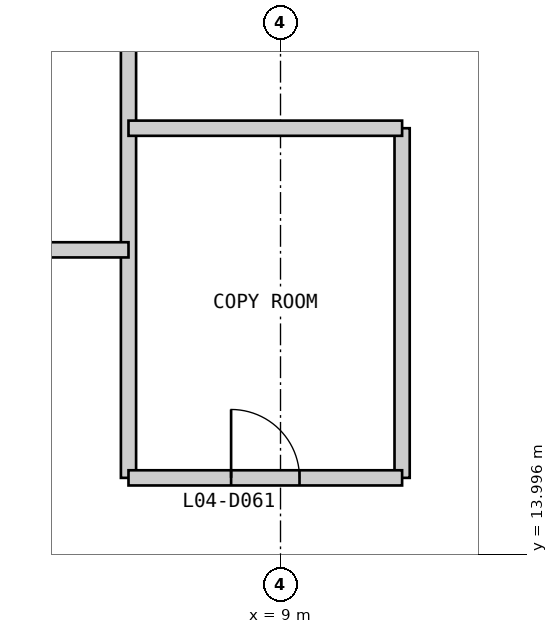
"""IFC4 building model, lengths in metres.
Left out: names, types, materials, properties, quantities, classifications, styles, units other than length and angle.
Written with IfcOpenShell. Run it as: python <this file> out.ifc"""

import sys

from ifc_helpers import new_model, si_unit, direction, frame, frame_2d, origin, place, context, subcontext, project, spatial, rectangle, extrude, element, fill, save


model = new_model("IFC4")
c1 = context("Model", 3, precision=1e-05, world=origin(), true_north=direction((0.0, 1.0)))
c2 = subcontext(c1, "Body", "Model", "MODEL_VIEW")
j1 = project(units=[si_unit("LENGTHUNIT", "METRE"), si_unit("PLANEANGLEUNIT", "RADIAN")], contexts=[c1])
p1 = place(None, origin())
s1 = spatial("IfcSite", under=j1, at=p1, CompositionType="ELEMENT")
p2 = place(p1, origin())
s2 = spatial("IfcBuilding", under=s1, at=p2, CompositionType="ELEMENT")
p3 = place(p2, frame((0.0, 0.0, 21.4)))
s3 = spatial("IfcBuildingStorey", under=s2, at=p3, CompositionType="ELEMENT", Elevation=21.4)
p4 = place(p3, frame((7.0, 15.0, 0.0), z_axis=(0.0, 0.0, 1.0), x_axis=(0.0, 1.0, 0.0)))
e1 = element("IfcWall", 1, at=p4, inside=s3, PredefinedType="PARTITIONING", context=c2, shape_type="SweptSolid", body=[
    extrude(rectangle(XDim=28.0, YDim=0.2, at=frame_2d((14.0, 0.0))), origin(), (0.0, 0.0, 1.0), 3.843),
])
p5 = place(p3, frame((10.6, 15.0, 0.0), z_axis=(0.0, 0.0, 1.0), x_axis=(0.0, 1.0, 0.0)))
e2 = element("IfcWall", 2, at=p5, inside=s3, PredefinedType="PARTITIONING", context=c2, shape_type="SweptSolid", body=[
    extrude(rectangle(XDim=4.6, YDim=0.2, at=frame_2d((2.3, 0.0))), origin(), (0.0, 0.0, 1.0), 4.5),
])
p6 = place(p3, frame((7.0, 15.0, 0.0), z_axis=(0.0, 0.0, 1.0), x_axis=(1.0, 0.0, 0.0)))
e3 = element("IfcWall", 3, at=p6, inside=s3, PredefinedType="PARTITIONING", context=c2, shape_type="SweptSolid", body=[
    extrude(rectangle(XDim=3.6, YDim=0.2, at=frame_2d((1.8, 0.0))), origin(), (0.0, 0.0, 1.0), 4.5),
])
p7 = place(p6, frame((1.35, 0.0, 0.0)))
e4 = element("IfcOpeningElement", 4, at=p7, cuts=e3, PredefinedType="OPENING", context=c2, shape_type="SweptSolid", body=[
    extrude(rectangle(XDim=0.9, YDim=2.2, at=frame_2d((0.45, 1.1))), frame((0.0, 0.11, 0.0), z_axis=(0.0, -1.0, 0.0), x_axis=(1.0, 0.0, 0.0)), (0.0, 0.0, 1.0), 0.22),
])
p8 = place(p3, frame((-2.0, 18.0, 0.0), z_axis=(0.0, 0.0, 1.0), x_axis=(1.0, 0.0, 0.0)))
e5 = element("IfcWall", 5, at=p8, inside=s3, PredefinedType="PARTITIONING", context=c2, shape_type="SweptSolid", body=[
    extrude(rectangle(XDim=9.0, YDim=0.2, at=frame_2d((4.5, 0.0))), origin(), (0.0, 0.0, 1.0), 4.5),
])
p9 = place(p3, frame((7.0, 19.6, 0.0), z_axis=(0.0, 0.0, 1.0), x_axis=(1.0, 0.0, 0.0)))
e6 = element("IfcWall", 6, at=p9, inside=s3, PredefinedType="PARTITIONING", context=c2, shape_type="SweptSolid", body=[
    extrude(rectangle(XDim=3.6, YDim=0.2, at=frame_2d((1.8, 0.0))), origin(), (0.0, 0.0, 1.0), 4.5),
])
p10 = place(p7, origin())
e7 = element("IfcDoor", 7, at=p10, inside=s3, OperationType="SINGLE_SWING_LEFT", PredefinedType="DOOR", context=c2, shape_type="SweptSolid", body=[
    extrude(rectangle(XDim=0.9, YDim=2.2, at=frame_2d((0.45, 1.1))), frame((0.0, 0.025, 0.0), z_axis=(0.0, -1.0, 0.0), x_axis=(1.0, 0.0, 0.0)), (0.0, 0.0, 1.0), 0.05),
])
fill(e4, e7)
save(model, sys.argv[1])
